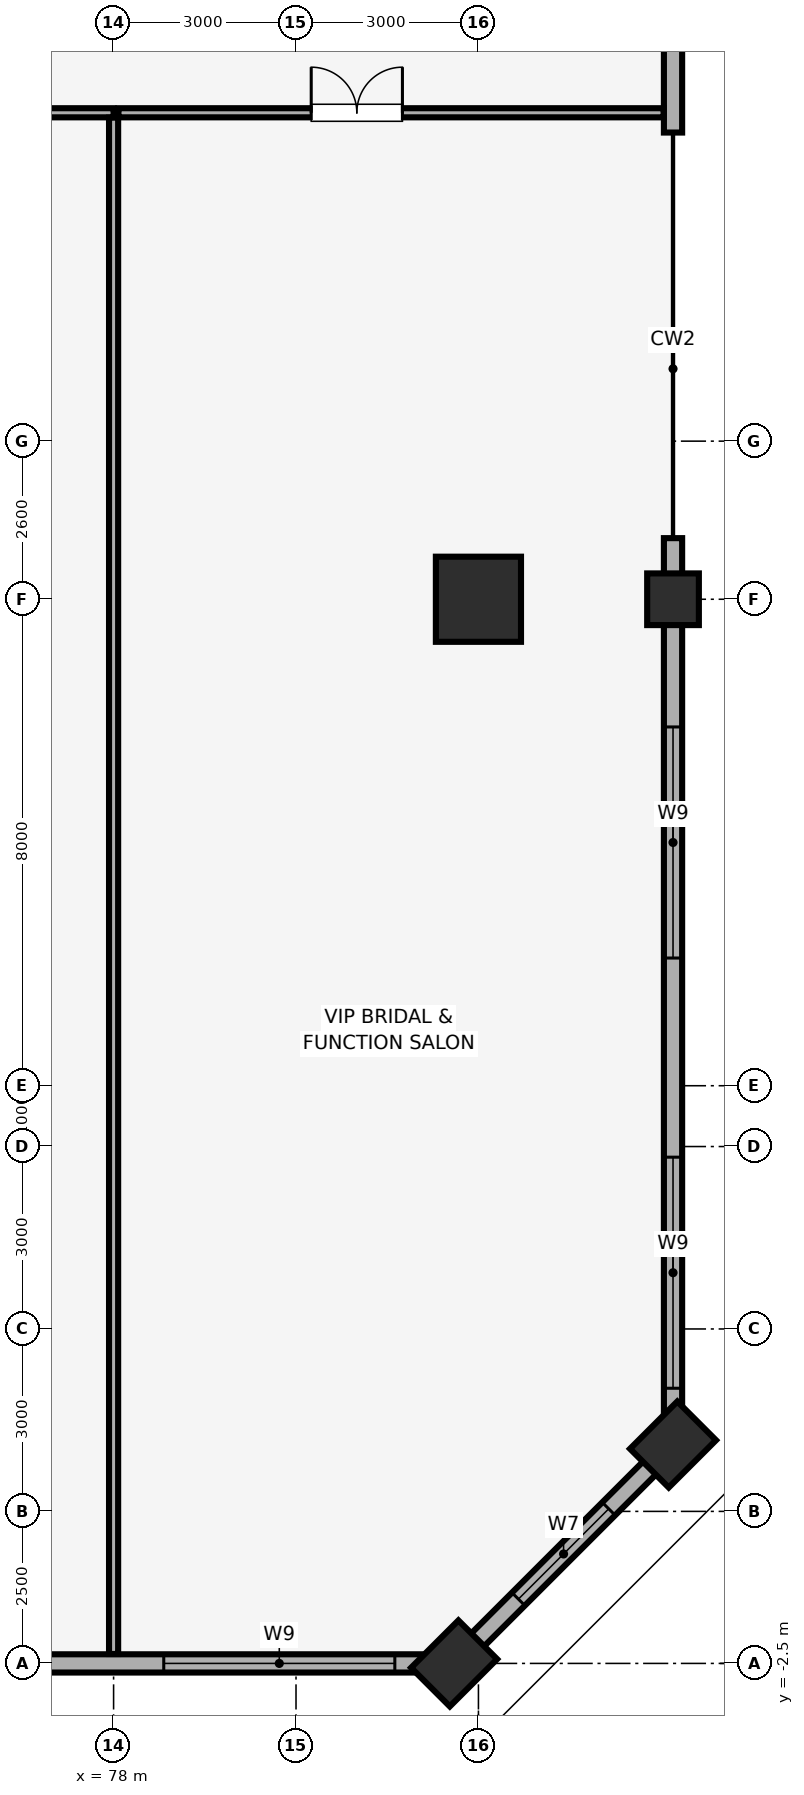
"""IFC4 building model, lengths in metres.
Left out: names, types, materials, properties, quantities, classifications, styles, units other than length and angle.
Written with IfcOpenShell. Run it as: python <this file> out.ifc"""

import sys

from ifc_helpers import new_model, si_unit, direction, frame, frame_2d, origin, origin_2d, place, context, subcontext, project, spatial, rectangle, extrude, element, fill, save


model = new_model("IFC4")
c1 = context("Model", 3, precision=1e-05, world=origin(), true_north=direction((0.0, 1.0)))
c2 = subcontext(c1, "Body", "Model", "MODEL_VIEW")
j1 = project(units=[si_unit("LENGTHUNIT", "METRE"), si_unit("PLANEANGLEUNIT", "RADIAN")], contexts=[c1])
p1 = place(None, origin())
s1 = spatial("IfcSite", under=j1, at=p1, CompositionType="ELEMENT")
p2 = place(p1, origin())
s2 = spatial("IfcBuilding", under=s1, at=p2, CompositionType="ELEMENT")
p3 = place(p2, frame((0.0, 0.0, 19.4)))
s3 = spatial("IfcBuildingStorey", under=s2, at=p3, CompositionType="ELEMENT", Elevation=19.4)
p4 = place(p3, frame((87.2, 15.0, 0.0), z_axis=(0.0, 0.0, 1.0), x_axis=(1.0, 0.0, 0.0)))
e1 = element("IfcColumn", 1, at=p4, inside=s3, PredefinedType="COLUMN", context=c2, shape_type="SweptSolid", body=[
    extrude(rectangle(XDim=0.85, YDim=0.85, at=origin_2d()), origin(), (0.0, 0.0, 1.0), 6.28),
])
for number, where, z_axis, x_axis in (
    (2, (83.6, -2.5, 0.0), (0.0, 0.0, 1.0), (0.707, 0.707, 0.0)),
    (3, (87.2, 1.1, 0.0), (0.0, 0.0, 1.0), (0.707, 0.707, 0.0)),
):
    element("IfcColumn", number, at=place(p3, frame(where, z_axis=z_axis, x_axis=x_axis)), inside=s3, PredefinedType="PILASTER", context=c2, shape_type="SweptSolid", body=[
        extrude(rectangle(XDim=1.1, YDim=0.9, at=origin_2d()), origin(), (0.0, 0.0, 1.0), 6.28),
    ])
p5 = place(p3, frame((84.0, 15.0, 0.0), z_axis=(0.0, 0.0, 1.0), x_axis=(1.0, 0.0, 0.0)))
e4 = element("IfcColumn", 4, at=p5, inside=s3, PredefinedType="COLUMN", context=c2, shape_type="SweptSolid", body=[
    extrude(rectangle(XDim=1.4, YDim=1.4, at=origin_2d()), origin(), (0.0, 0.0, 1.0), 6.28),
])
p6 = place(p3, frame((66.875, -2.5, 0.0), z_axis=(0.0, 0.0, 1.0), x_axis=(1.0, 0.0, 0.0)))
e5 = element("IfcWall", 5, at=p6, inside=s3, PredefinedType="SOLIDWALL", context=c2, shape_type="SweptSolid", body=[
    extrude(rectangle(XDim=16.725, YDim=0.3, at=frame_2d((8.363, 0.0))), origin(), (0.0, 0.0, 1.0), 5.33),
])
p7 = place(p6, frame((2.625, 0.0, 0.85)))
e6 = element("IfcOpeningElement", 6, at=p7, cuts=e5, PredefinedType="OPENING", context=c2, shape_type="SweptSolid", body=[
    extrude(rectangle(XDim=3.8, YDim=2.2, at=frame_2d((1.9, 1.1))), frame((0.0, 0.16, 0.0), z_axis=(0.0, -1.0, 0.0), x_axis=(1.0, 0.0, 0.0)), (0.0, 0.0, 1.0), 0.32),
])
p8 = place(p6, frame((11.95, 0.0, 0.85)))
e7 = element("IfcOpeningElement", 7, at=p8, cuts=e5, PredefinedType="OPENING", context=c2, shape_type="SweptSolid", body=[
    extrude(rectangle(XDim=3.8, YDim=2.2, at=frame_2d((1.9, 1.1))), frame((0.0, 0.16, 0.0), z_axis=(0.0, -1.0, 0.0), x_axis=(1.0, 0.0, 0.0)), (0.0, 0.0, 1.0), 0.32),
])
p9 = place(p3, frame((83.6, -2.5, 0.0), z_axis=(0.0, 0.0, 1.0), x_axis=(0.707082803744, 0.707130757816, 0.0)))
e8 = element("IfcWall", 8, at=p9, inside=s3, PredefinedType="SOLIDWALL", context=c2, shape_type="SweptSolid", body=[
    extrude(rectangle(XDim=5.091, YDim=0.3, at=frame_2d((2.545, 0.0))), origin(), (0.0, 0.0, 1.0), 5.33),
])
p10 = place(p9, frame((1.496, 0.0, 0.85)))
e9 = element("IfcOpeningElement", 9, at=p10, cuts=e8, PredefinedType="OPENING", context=c2, shape_type="SweptSolid", body=[
    extrude(rectangle(XDim=2.1, YDim=1.6, at=frame_2d((1.05, 0.8))), frame((0.0, 0.16, 0.0), z_axis=(0.0, -1.0, 0.0), x_axis=(1.0, 0.0, 0.0)), (0.0, 0.0, 1.0), 0.32),
])
p11 = place(p3, frame((87.2, 1.1, 0.0), z_axis=(0.0, 0.0, 1.0), x_axis=(0.0, 1.0, 0.0)))
e10 = element("IfcWall", 10, at=p11, inside=s3, PredefinedType="SOLIDWALL", context=c2, shape_type="SweptSolid", body=[
    extrude(rectangle(XDim=14.905, YDim=0.3, at=frame_2d((7.452, 0.0))), origin(), (0.0, 0.0, 1.0), 5.33),
])
p12 = place(p11, frame((0.925, 0.0, 0.85)))
e11 = element("IfcOpeningElement", 11, at=p12, cuts=e10, PredefinedType="OPENING", context=c2, shape_type="SweptSolid", body=[
    extrude(rectangle(XDim=3.8, YDim=2.2, at=frame_2d((1.9, 1.1))), frame((0.0, 0.16, 0.0), z_axis=(0.0, -1.0, 0.0), x_axis=(1.0, 0.0, 0.0)), (0.0, 0.0, 1.0), 0.32),
])
p13 = place(p11, frame((8.0, 0.0, 0.85)))
e12 = element("IfcOpeningElement", 12, at=p13, cuts=e10, PredefinedType="OPENING", context=c2, shape_type="SweptSolid", body=[
    extrude(rectangle(XDim=3.8, YDim=2.2, at=frame_2d((1.9, 1.1))), frame((0.0, 0.16, 0.0), z_axis=(0.0, -1.0, 0.0), x_axis=(1.0, 0.0, 0.0)), (0.0, 0.0, 1.0), 0.32),
])
p14 = place(p3, frame((87.2, 22.675, 0.0), z_axis=(0.0, 0.0, 1.0), x_axis=(0.0, 1.0, 0.0)))
e13 = element("IfcWall", 13, at=p14, inside=s3, PredefinedType="SOLIDWALL", context=c2, shape_type="SweptSolid", body=[
    extrude(rectangle(XDim=3.05, YDim=0.3, at=frame_2d((1.525, 0.0))), origin(), (0.0, 0.0, 1.0), 5.33),
])
p15 = place(p3, frame((52.08, 23.0, 0.0), z_axis=(0.0, 0.0, 1.0), x_axis=(1.0, 0.0, 0.0)))
e14 = element("IfcWall", 14, at=p15, inside=s3, PredefinedType="PARTITIONING", context=c2, shape_type="SweptSolid", body=[
    extrude(rectangle(XDim=25.92, YDim=0.15, at=frame_2d((12.96, 0.0))), origin(), (0.0, 0.0, 1.0), 6.28),
])
p16 = place(p15, frame((11.17, 0.0, 0.0)))
e15 = element("IfcOpeningElement", 15, at=p16, cuts=e14, PredefinedType="OPENING", context=c2, shape_type="SweptSolid", body=[
    extrude(rectangle(XDim=1.5, YDim=2.25, at=frame_2d((0.75, 1.125))), frame((0.0, 0.085, 0.0), z_axis=(0.0, -1.0, 0.0), x_axis=(1.0, 0.0, 0.0)), (0.0, 0.0, 1.0), 0.17),
])
p17 = place(p3, frame((78.0, -2.345, 0.0), z_axis=(0.0, 0.0, 1.0), x_axis=(0.0, 1.0, 0.0)))
e16 = element("IfcWall", 16, at=p17, inside=s3, PredefinedType="PARTITIONING", context=c2, shape_type="SweptSolid", body=[
    extrude(rectangle(XDim=25.265, YDim=0.15, at=frame_2d((12.632, 0.0))), origin(), (0.0, 0.0, 1.0), 6.28),
])
p18 = place(p3, frame((78.08, 23.0, 0.0), z_axis=(0.0, 0.0, 1.0), x_axis=(1.0, 0.0, 0.0)))
e17 = element("IfcWall", 17, at=p18, inside=s3, PredefinedType="PARTITIONING", context=c2, shape_type="SweptSolid", body=[
    extrude(rectangle(XDim=8.965, YDim=0.15, at=frame_2d((4.482, 0.0))), origin(), (0.0, 0.0, 1.0), 6.28),
])
p19 = place(p18, frame((3.17, 0.0, 0.0)))
e18 = element("IfcOpeningElement", 18, at=p19, cuts=e17, PredefinedType="OPENING", context=c2, shape_type="SweptSolid", body=[
    extrude(rectangle(XDim=1.5, YDim=2.25, at=frame_2d((0.75, 1.125))), frame((0.0, 0.085, 0.0), z_axis=(0.0, -1.0, 0.0), x_axis=(1.0, 0.0, 0.0)), (0.0, 0.0, 1.0), 0.17),
])
p20 = place(p10, origin())
e19 = element("IfcWindow", 19, at=p20, inside=s3, PartitioningType="SINGLE_PANEL", PredefinedType="WINDOW", context=c2, shape_type="SweptSolid", body=[
    extrude(rectangle(XDim=2.1, YDim=1.6, at=frame_2d((1.05, 0.8))), frame((0.0, 0.03, 0.0), z_axis=(0.0, -1.0, 0.0), x_axis=(1.0, 0.0, 0.0)), (0.0, 0.0, 1.0), 0.06),
])
fill(e9, e19)
p21 = place(p8, origin())
e20 = element("IfcWindow", 20, at=p21, inside=s3, PartitioningType="SINGLE_PANEL", PredefinedType="WINDOW", context=c2, shape_type="SweptSolid", body=[
    extrude(rectangle(XDim=3.8, YDim=2.2, at=frame_2d((1.9, 1.1))), frame((0.0, 0.03, 0.0), z_axis=(0.0, -1.0, 0.0), x_axis=(1.0, 0.0, 0.0)), (0.0, 0.0, 1.0), 0.06),
])
fill(e7, e20)
p22 = place(p12, origin())
e21 = element("IfcWindow", 21, at=p22, inside=s3, PartitioningType="SINGLE_PANEL", PredefinedType="WINDOW", context=c2, shape_type="SweptSolid", body=[
    extrude(rectangle(XDim=3.8, YDim=2.2, at=frame_2d((1.9, 1.1))), frame((0.0, 0.03, 0.0), z_axis=(0.0, -1.0, 0.0), x_axis=(1.0, 0.0, 0.0)), (0.0, 0.0, 1.0), 0.06),
])
fill(e11, e21)
p23 = place(p13, origin())
e22 = element("IfcWindow", 22, at=p23, inside=s3, PartitioningType="SINGLE_PANEL", PredefinedType="WINDOW", context=c2, shape_type="SweptSolid", body=[
    extrude(rectangle(XDim=3.8, YDim=2.2, at=frame_2d((1.9, 1.1))), frame((0.0, 0.03, 0.0), z_axis=(0.0, -1.0, 0.0), x_axis=(1.0, 0.0, 0.0)), (0.0, 0.0, 1.0), 0.06),
])
fill(e12, e22)
p24 = place(p19, origin())
e23 = element("IfcDoor", 23, at=p24, inside=s3, OperationType="DOUBLE_DOOR_SINGLE_SWING", PredefinedType="DOOR", context=c2, shape_type="SweptSolid", body=[
    extrude(rectangle(XDim=1.5, YDim=2.25, at=frame_2d((0.75, 1.125))), frame((0.0, 0.025, 0.0), z_axis=(0.0, -1.0, 0.0), x_axis=(1.0, 0.0, 0.0)), (0.0, 0.0, 1.0), 0.05),
])
fill(e18, e23)
save(model, sys.argv[1])
